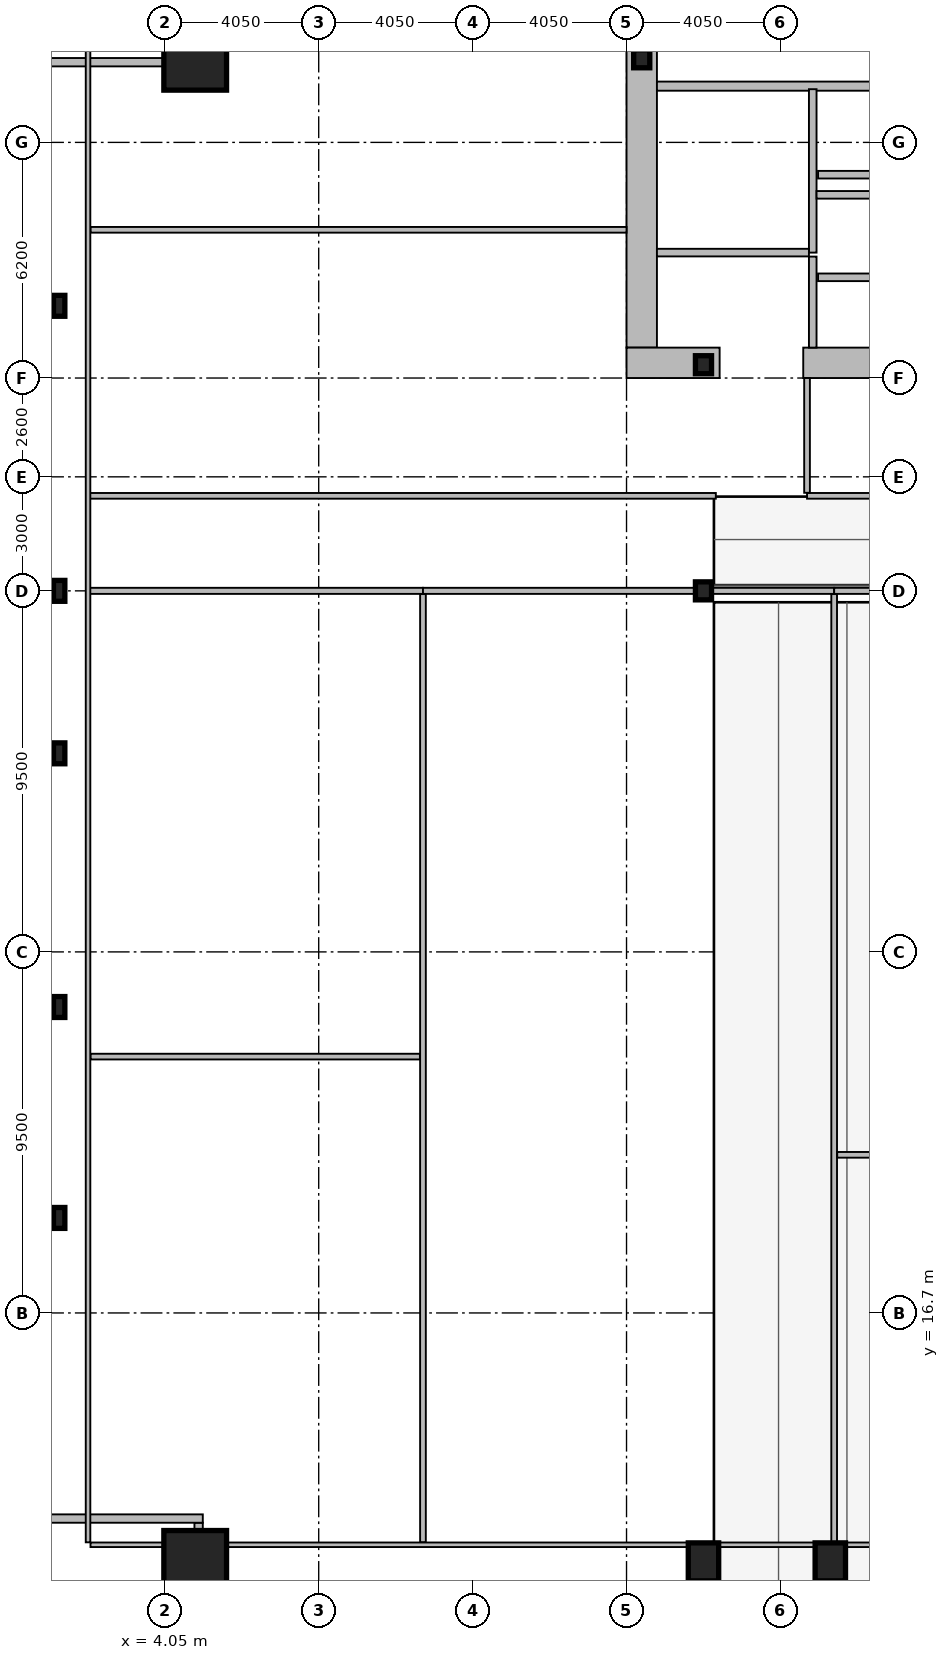
"""IFC4 building model, lengths in metres.
Left out: names, types, materials, properties, quantities, classifications, styles, units other than length and angle.
Written with IfcOpenShell. Run it as: python <this file> out.ifc"""

import sys

from ifc_helpers import new_model, si_unit, direction, frame, frame_2d, origin, origin_2d, place, context, subcontext, project, spatial, rectangle, hollow_rectangle, i_section, extrude, element, fill, save


model = new_model("IFC4")
c1 = context("Model", 3, precision=1e-05, world=origin(), true_north=direction((0.0, 1.0)))
c2 = subcontext(c1, "Body", "Model", "MODEL_VIEW")
j1 = project(units=[si_unit("LENGTHUNIT", "METRE"), si_unit("PLANEANGLEUNIT", "RADIAN")], contexts=[c1])
p1 = place(None, origin())
s1 = spatial("IfcSite", under=j1, at=p1, CompositionType="ELEMENT")
p2 = place(p1, origin())
s2 = spatial("IfcBuilding", under=s1, at=p2, CompositionType="ELEMENT")
p3 = place(p2, frame((0.0, 0.0, 61.8)))
s3 = spatial("IfcBuildingStorey", under=s2, at=p3, CompositionType="ELEMENT", Elevation=61.8)
p4 = place(p3, frame((16.6, 42.1, 0.0), z_axis=(0.0, 0.0, 1.0), x_axis=(0.0, 1.0, 0.0)))
e1 = element("IfcWall", 1, at=p4, inside=s3, PredefinedType="SHEAR", context=c2, shape_type="SweptSolid", body=[
    extrude(rectangle(XDim=10.8, YDim=0.8, at=frame_2d((5.4, 0.0))), origin(), (0.0, 0.0, 1.0), 3.82),
])
p5 = place(p3, frame((18.65, 41.7, 0.0), z_axis=(0.0, 0.0, 1.0), x_axis=(-1.0, 0.0, 0.0)))
e2 = element("IfcWall", 2, at=p5, inside=s3, PredefinedType="SHEAR", context=c2, shape_type="SweptSolid", body=[
    extrude(rectangle(XDim=2.45, YDim=0.8, at=frame_2d((1.225, 0.0))), origin(), (0.0, 0.0, 1.0), 3.82),
])
p6 = place(p3, frame((32.3, 41.7, 0.0), z_axis=(0.0, 0.0, 1.0), x_axis=(-1.0, 0.0, 0.0)))
e3 = element("IfcWall", 3, at=p6, inside=s3, PredefinedType="SHEAR", context=c2, shape_type="SweptSolid", body=[
    extrude(rectangle(XDim=11.45, YDim=0.8, at=frame_2d((5.725, 0.0))), origin(), (0.0, 0.0, 1.0), 3.82),
])
p7 = place(p3, frame((17.0, 48.98, 0.0), z_axis=(0.0, 0.0, 1.0), x_axis=(1.0, 0.0, 0.0)))
e4 = element("IfcWall", 4, at=p7, inside=s3, PredefinedType="SHEAR", context=c2, shape_type="SweptSolid", body=[
    extrude(rectangle(XDim=7.22, YDim=0.24, at=frame_2d((3.61, 0.0))), origin(), (0.0, 0.0, 1.0), 3.82),
])
p8 = place(p7, frame((0.22, 0.0, 0.0)))
e5 = element("IfcOpeningElement", 5, at=p8, cuts=e4, PredefinedType="OPENING", context=c2, shape_type="SweptSolid", body=[
    extrude(rectangle(XDim=1.05, YDim=2.15, at=frame_2d((0.525, 1.075))), frame((0.0, 0.13, 0.0), z_axis=(0.0, -1.0, 0.0), x_axis=(1.0, 0.0, 0.0)), (0.0, 0.0, 1.0), 0.26),
])
for number, where, z_axis, x_axis in (
    (6, (4.85, 10.15, 0.0), (0.0, 0.0, 1.0), (1.0, 0.0, 0.0)),
    (7, (4.85, 49.7, 0.0), (0.0, 0.0, 1.0), (1.0, 0.0, 0.0)),
):
    element("IfcColumn", number, at=place(p3, frame(where, z_axis=z_axis, x_axis=x_axis)), inside=s3, PredefinedType="COLUMN", context=c2, shape_type="SweptSolid", body=[
        extrude(hollow_rectangle(XDim=1.65, YDim=1.65, WallThickness=0.075, at=origin_2d()), origin(), (0.0, 0.0, 1.0), 4.0),
    ])
for number, where, z_axis, x_axis in (
    (8, (18.225, 10.15, 0.0), (0.0, 0.0, 1.0), (1.0, 0.0, 0.0)),
    (9, (21.562, 10.15, 0.0), (0.0, 0.0, 1.0), (1.0, 0.0, 0.0)),
):
    element("IfcColumn", number, at=place(p3, frame(where, z_axis=z_axis, x_axis=x_axis)), inside=s3, PredefinedType="COLUMN", context=c2, shape_type="SweptSolid", body=[
        extrude(hollow_rectangle(XDim=0.8, YDim=1.0, WallThickness=0.055, at=origin_2d()), origin(), (0.0, 0.0, 1.0), 4.0),
    ])
for number, where, z_axis, x_axis in (
    (10, (1.27, 19.2, 0.0), (0.0, 0.0, 1.0), (1.0, 0.0, 0.0)),
    (11, (1.27, 24.75, 0.0), (0.0, 0.0, 1.0), (1.0, 0.0, 0.0)),
    (12, (1.27, 31.425, 0.0), (0.0, 0.0, 1.0), (1.0, 0.0, 0.0)),
    (13, (1.27, 35.7, 0.0), (0.0, 0.0, 1.0), (1.0, 0.0, 0.0)),
    (14, (1.27, 43.2, 0.0), (0.0, 0.0, 1.0), (1.0, 0.0, 0.0)),
):
    element("IfcColumn", number, at=place(p3, frame(where, z_axis=z_axis, x_axis=x_axis)), inside=s3, PredefinedType="COLUMN", context=c2, shape_type="SweptSolid", body=[
        extrude(i_section(OverallWidth=0.3, OverallDepth=0.55, WebThickness=0.015, FlangeThickness=0.029, at=origin_2d()), origin(), (0.0, 0.0, 1.0), 4.0),
    ])
for number, where, z_axis, x_axis in (
    (15, (16.6, 49.7, 0.0), (0.0, 0.0, 1.0), (1.0, 0.0, 0.0)),
    (16, (18.225, 35.7, 0.0), (0.0, 0.0, 1.0), (1.0, 0.0, 0.0)),
    (17, (18.225, 41.65, 0.0), (0.0, 0.0, 1.0), (1.0, 0.0, 0.0)),
):
    element("IfcColumn", number, at=place(p3, frame(where, z_axis=z_axis, x_axis=x_axis)), inside=s3, PredefinedType="COLUMN", context=c2, shape_type="SweptSolid", body=[
        extrude(i_section(OverallWidth=0.424, OverallDepth=0.474, WebThickness=0.048, FlangeThickness=0.077, at=origin_2d()), origin(), (0.0, 0.0, 1.0), 4.0),
    ])
p9 = place(p3, frame((4.94, 7.27, 0.0), z_axis=(0.0, 0.0, 1.0), x_axis=(0.0, 1.0, 0.0)))
e18 = element("IfcWall", 18, at=p9, inside=s3, PredefinedType="SOLIDWALL", context=c2, shape_type="SweptSolid", body=[
    extrude(rectangle(XDim=3.91, YDim=0.22, at=frame_2d((1.955, 0.0))), origin(), (0.0, 0.0, 1.0), 3.16),
])
for number, where, z_axis, x_axis in (
    (19, (5.05, 11.29, 0.0), (0.0, 0.0, 1.0), (-1.0, 0.0, 0.0)),
    (20, (0.83, 49.61, 0.0), (0.0, 0.0, 1.0), (1.0, 0.0, 0.0)),
):
    element("IfcWall", number, at=place(p3, frame(where, z_axis=z_axis, x_axis=x_axis)), inside=s3, PredefinedType="SOLIDWALL", context=c2, shape_type="SweptSolid", body=[
        extrude(rectangle(XDim=4.22, YDim=0.22, at=frame_2d((2.11, 0.0))), origin(), (0.0, 0.0, 1.0), 3.16),
    ])
p10 = place(p3, frame((4.94, 49.72, 0.0), z_axis=(0.0, 0.0, 1.0), x_axis=(0.0, 1.0, 0.0)))
e21 = element("IfcWall", 21, at=p10, inside=s3, PredefinedType="SOLIDWALL", context=c2, shape_type="SweptSolid", body=[
    extrude(rectangle(XDim=3.91, YDim=0.22, at=frame_2d((1.955, 0.0))), origin(), (0.0, 0.0, 1.0), 3.16),
])
p11 = place(p3, frame((24.21, 43.95, 0.0), z_axis=(0.0, 0.0, 1.0), x_axis=(-1.0, 0.0, 0.0)))
e22 = element("IfcWall", 22, at=p11, inside=s3, PredefinedType="PARTITIONING", context=c2, shape_type="SweptSolid", body=[
    extrude(rectangle(XDim=2.97, YDim=0.2, at=frame_2d((1.485, 0.0))), origin(), (0.0, 0.0, 1.0), 3.82),
])
p12 = place(p11, frame((0.86, 0.0, 0.0)))
e23 = element("IfcOpeningElement", 23, at=p12, cuts=e22, PredefinedType="OPENING", context=c2, shape_type="SweptSolid", body=[
    extrude(rectangle(XDim=1.3, YDim=2.18, at=frame_2d((0.65, 1.09))), frame((0.0, 0.11, 0.0), z_axis=(0.0, -1.0, 0.0), x_axis=(1.0, 0.0, 0.0)), (0.0, 0.0, 1.0), 0.22),
])
p13 = place(p3, frame((24.21, 46.65, 0.0), z_axis=(0.0, 0.0, 1.0), x_axis=(-1.0, 0.0, 0.0)))
e24 = element("IfcWall", 24, at=p13, inside=s3, PredefinedType="PARTITIONING", context=c2, shape_type="SweptSolid", body=[
    extrude(rectangle(XDim=2.97, YDim=0.2, at=frame_2d((1.485, 0.0))), origin(), (0.0, 0.0, 1.0), 3.82),
])
p14 = place(p13, frame((0.91, 0.0, 0.0)))
e25 = element("IfcOpeningElement", 25, at=p14, cuts=e24, PredefinedType="OPENING", context=c2, shape_type="SweptSolid", body=[
    extrude(rectangle(XDim=1.2, YDim=2.18, at=frame_2d((0.6, 1.09))), frame((0.0, 0.11, 0.0), z_axis=(0.0, -1.0, 0.0), x_axis=(1.0, 0.0, 0.0)), (0.0, 0.0, 1.0), 0.22),
])
p15 = place(p3, frame((21.1, 44.6, 0.0), z_axis=(0.0, 0.0, 1.0), x_axis=(0.0, 1.0, 0.0)))
e26 = element("IfcWall", 26, at=p15, inside=s3, PredefinedType="PARTITIONING", context=c2, shape_type="SweptSolid", body=[
    extrude(rectangle(XDim=4.3, YDim=0.2, at=frame_2d((2.15, 0.0))), origin(), (0.0, 0.0, 1.0), 3.82),
])
p16 = place(p3, frame((17.0, 44.6, 0.0), z_axis=(0.0, 0.0, 1.0), x_axis=(1.0, 0.0, 0.0)))
e27 = element("IfcWall", 27, at=p16, inside=s3, PredefinedType="PARTITIONING", context=c2, shape_type="SweptSolid", body=[
    extrude(rectangle(XDim=4.0, YDim=0.2, at=frame_2d((2.0, 0.0))), origin(), (0.0, 0.0, 1.0), 3.82),
])
p17 = place(p16, frame((1.25, 0.0, 0.0)))
e28 = element("IfcOpeningElement", 28, at=p17, cuts=e27, PredefinedType="OPENING", context=c2, shape_type="SweptSolid", body=[
    extrude(rectangle(XDim=1.05, YDim=2.15, at=frame_2d((0.525, 1.075))), frame((0.0, 0.11, 0.0), z_axis=(0.0, -1.0, 0.0), x_axis=(1.0, 0.0, 0.0)), (0.0, 0.0, 1.0), 0.22),
])
p18 = place(p3, frame((21.2, 46.12, 0.0), z_axis=(0.0, 0.0, 1.0), x_axis=(1.0, 0.0, 0.0)))
e29 = element("IfcWall", 29, at=p18, inside=s3, PredefinedType="PARTITIONING", context=c2, shape_type="SweptSolid", body=[
    extrude(rectangle(XDim=3.02, YDim=0.2, at=frame_2d((1.51, 0.0))), origin(), (0.0, 0.0, 1.0), 3.82),
])
p19 = place(p3, frame((21.1, 42.1, 0.0), z_axis=(0.0, 0.0, 1.0), x_axis=(0.0, 1.0, 0.0)))
e30 = element("IfcWall", 30, at=p19, inside=s3, PredefinedType="PARTITIONING", context=c2, shape_type="SweptSolid", body=[
    extrude(rectangle(XDim=2.395, YDim=0.2, at=frame_2d((1.198, 0.0))), origin(), (0.0, 0.0, 1.0), 3.82),
])
p20 = place(p19, frame((0.38, 0.0, 0.0)))
e31 = element("IfcOpeningElement", 31, at=p20, cuts=e30, PredefinedType="OPENING", context=c2, shape_type="SweptSolid", body=[
    extrude(rectangle(XDim=1.05, YDim=2.15, at=frame_2d((0.525, 1.075))), frame((0.0, 0.11, 0.0), z_axis=(0.0, -1.0, 0.0), x_axis=(1.0, 0.0, 0.0)), (0.0, 0.0, 1.0), 0.22),
])
p21 = place(p3, frame((20.95, 38.2, 0.0), z_axis=(0.0, 0.0, 1.0), x_axis=(1.0, 0.0, 0.0)))
e32 = element("IfcWall", 32, at=p21, inside=s3, PredefinedType="PARTITIONING", context=c2, shape_type="SweptSolid", body=[
    extrude(rectangle(XDim=3.35, YDim=0.15, at=frame_2d((1.675, 0.0))), origin(), (0.0, 0.0, 1.0), 3.82),
])
p22 = place(p21, frame((0.9, 0.0, 0.0)))
e33 = element("IfcOpeningElement", 33, at=p22, cuts=e32, PredefinedType="OPENING", context=c2, shape_type="SweptSolid", body=[
    extrude(rectangle(XDim=0.95, YDim=2.05, at=frame_2d((0.475, 1.025))), frame((0.0, 0.085, 0.0), z_axis=(0.0, -1.0, 0.0), x_axis=(1.0, 0.0, 0.0)), (0.0, 0.0, 1.0), 0.17),
])
p23 = place(p3, frame((20.95, 38.28, 0.0), z_axis=(0.0, 0.0, 1.0), x_axis=(0.0, 1.0, 0.0)))
e34 = element("IfcWall", 34, at=p23, inside=s3, PredefinedType="PARTITIONING", context=c2, shape_type="SweptSolid", body=[
    extrude(rectangle(XDim=3.02, YDim=0.15, at=frame_2d((1.51, 0.0))), origin(), (0.0, 0.0, 1.0), 3.82),
])
p24 = place(p3, frame((2.03, 38.2, 0.0), z_axis=(0.0, 0.0, 1.0), x_axis=(1.0, 0.0, 0.0)))
e35 = element("IfcWall", 35, at=p24, inside=s3, PredefinedType="PARTITIONING", context=c2, shape_type="SweptSolid", body=[
    extrude(rectangle(XDim=16.52, YDim=0.15, at=frame_2d((8.26, 0.0))), origin(), (0.0, 0.0, 1.0), 3.01),
])
p25 = place(p24, frame((12.32, 0.0, 0.0)))
e36 = element("IfcOpeningElement", 36, at=p25, cuts=e35, PredefinedType="OPENING", context=c2, shape_type="SweptSolid", body=[
    extrude(rectangle(XDim=0.95, YDim=2.05, at=frame_2d((0.475, 1.025))), frame((0.0, 0.085, 0.0), z_axis=(0.0, -1.0, 0.0), x_axis=(1.0, 0.0, 0.0)), (0.0, 0.0, 1.0), 0.17),
])
p26 = place(p3, frame((2.095, 45.2, 0.0), z_axis=(0.0, 0.0, 1.0), x_axis=(1.0, 0.0, 0.0)))
e37 = element("IfcWall", 37, at=p26, inside=s3, PredefinedType="PARTITIONING", context=c2, shape_type="SweptSolid", body=[
    extrude(rectangle(XDim=14.105, YDim=0.15, at=frame_2d((7.052, 0.0))), origin(), (0.0, 0.0, 1.0), 3.16),
])
p27 = place(p26, frame((12.32, 0.0, 0.0)))
e38 = element("IfcOpeningElement", 38, at=p27, cuts=e37, PredefinedType="OPENING", context=c2, shape_type="SweptSolid", body=[
    extrude(rectangle(XDim=0.9, YDim=2.05, at=frame_2d((0.45, 1.025))), frame((0.0, 0.085, 0.0), z_axis=(0.0, -1.0, 0.0), x_axis=(1.0, 0.0, 0.0)), (0.0, 0.0, 1.0), 0.17),
])
p28 = place(p3, frame((2.03, 35.7, 0.0), z_axis=(0.0, 0.0, 1.0), x_axis=(1.0, 0.0, 0.0)))
e39 = element("IfcWall", 39, at=p28, inside=s3, PredefinedType="PARTITIONING", context=c2, shape_type="SweptSolid", body=[
    extrude(rectangle(XDim=8.813, YDim=0.16, at=frame_2d((4.407, 0.0))), origin(), (0.0, 0.0, 1.0), 3.01),
])
p29 = place(p28, frame((3.952, 0.0, 0.0)))
e40 = element("IfcOpeningElement", 40, at=p29, cuts=e39, PredefinedType="OPENING", context=c2, shape_type="SweptSolid", body=[
    extrude(rectangle(XDim=1.0, YDim=2.05, at=frame_2d((0.5, 1.025))), frame((0.0, 0.09, 0.0), z_axis=(0.0, -1.0, 0.0), x_axis=(1.0, 0.0, 0.0)), (0.0, 0.0, 1.0), 0.18),
])
p30 = place(p3, frame((2.095, 23.445, 0.0), z_axis=(0.0, 0.0, 1.0), x_axis=(1.0, 0.0, 0.0)))
e41 = element("IfcWall", 41, at=p30, inside=s3, PredefinedType="PARTITIONING", context=c2, shape_type="SweptSolid", body=[
    extrude(rectangle(XDim=8.668, YDim=0.15, at=frame_2d((4.334, 0.0))), origin(), (0.0, 0.0, 1.0), 3.82),
])
p31 = place(p30, frame((3.966, 0.0, 0.0)))
e42 = element("IfcOpeningElement", 42, at=p31, cuts=e41, PredefinedType="OPENING", context=c2, shape_type="SweptSolid", body=[
    extrude(rectangle(XDim=0.9, YDim=2.05, at=frame_2d((0.45, 1.025))), frame((0.0, 0.085, 0.0), z_axis=(0.0, -1.0, 0.0), x_axis=(1.0, 0.0, 0.0)), (0.0, 0.0, 1.0), 0.17),
])
p32 = place(p3, frame((10.844, 35.7, 0.0), z_axis=(0.0, 0.0, 1.0), x_axis=(1.0, 0.0, 0.0)))
e43 = element("IfcWall", 43, at=p32, inside=s3, PredefinedType="PARTITIONING", context=c2, shape_type="SweptSolid", body=[
    extrude(rectangle(XDim=10.82, YDim=0.16, at=frame_2d((5.41, 0.0))), origin(), (0.0, 0.0, 1.0), 3.01),
])
p33 = place(p32, frame((4.794, 0.0, 0.0)))
e44 = element("IfcOpeningElement", 44, at=p33, cuts=e43, PredefinedType="OPENING", context=c2, shape_type="SweptSolid", body=[
    extrude(rectangle(XDim=1.0, YDim=2.05, at=frame_2d((0.5, 1.025))), frame((0.0, 0.09, 0.0), z_axis=(0.0, -1.0, 0.0), x_axis=(1.0, 0.0, 0.0)), (0.0, 0.0, 1.0), 0.18),
])
p34 = place(p3, frame((10.844, 10.665, 0.0), z_axis=(0.0, 0.0, 1.0), x_axis=(0.0, 1.0, 0.0)))
e45 = element("IfcWall", 45, at=p34, inside=s3, PredefinedType="PARTITIONING", context=c2, shape_type="SweptSolid", body=[
    extrude(rectangle(XDim=24.95, YDim=0.15, at=frame_2d((12.475, 0.0))), origin(), (0.0, 0.0, 1.0), 3.01),
])
p35 = place(p3, frame((21.664, 35.7, 0.0), z_axis=(0.0, 0.0, 1.0), x_axis=(1.0, 0.0, 0.0)))
e46 = element("IfcWall", 46, at=p35, inside=s3, PredefinedType="PARTITIONING", context=c2, shape_type="SweptSolid", body=[
    extrude(rectangle(XDim=13.017, YDim=0.16, at=frame_2d((6.508, 0.0))), origin(), (0.0, 0.0, 1.0), 3.01),
])
p36 = place(p35, frame((5.717, 0.0, 0.0)))
e47 = element("IfcOpeningElement", 47, at=p36, cuts=e46, PredefinedType="OPENING", context=c2, shape_type="SweptSolid", body=[
    extrude(rectangle(XDim=1.0, YDim=2.05, at=frame_2d((0.5, 1.025))), frame((0.0, 0.09, 0.0), z_axis=(0.0, -1.0, 0.0), x_axis=(1.0, 0.0, 0.0)), (0.0, 0.0, 1.0), 0.18),
])
p37 = place(p3, frame((21.664, 10.665, 0.0), z_axis=(0.0, 0.0, 1.0), x_axis=(0.0, 1.0, 0.0)))
e48 = element("IfcWall", 48, at=p37, inside=s3, PredefinedType="PARTITIONING", context=c2, shape_type="SweptSolid", body=[
    extrude(rectangle(XDim=24.95, YDim=0.15, at=frame_2d((12.475, 0.0))), origin(), (0.0, 0.0, 1.0), 3.21),
])
p38 = place(p3, frame((21.744, 20.861, 0.0), z_axis=(0.0, 0.0, 1.0), x_axis=(1.0, 0.0, 0.0)))
e49 = element("IfcWall", 49, at=p38, inside=s3, PredefinedType="PARTITIONING", context=c2, shape_type="SweptSolid", body=[
    extrude(rectangle(XDim=12.857, YDim=0.15, at=frame_2d((6.428, 0.0))), origin(), (0.0, 0.0, 1.0), 3.01),
])
p39 = place(p38, frame((5.858, 0.0, 0.0)))
e50 = element("IfcOpeningElement", 50, at=p39, cuts=e49, PredefinedType="OPENING", context=c2, shape_type="SweptSolid", body=[
    extrude(rectangle(XDim=0.9, YDim=2.05, at=frame_2d((0.45, 1.025))), frame((0.0, 0.085, 0.0), z_axis=(0.0, -1.0, 0.0), x_axis=(1.0, 0.0, 0.0)), (0.0, 0.0, 1.0), 0.17),
])
p40 = place(p3, frame((2.03, 10.665, 0.0), z_axis=(0.0, 0.0, 1.0), x_axis=(0.0, 1.0, 0.0)))
e51 = element("IfcWall", 51, at=p40, inside=s3, PredefinedType="PARTITIONING", context=c2, shape_type="SweptSolid", body=[
    extrude(rectangle(XDim=42.11, YDim=0.12, at=frame_2d((21.055, 0.0))), origin(), (0.0, 0.0, 1.0), 3.01),
])
p41 = place(p3, frame((2.095, 10.6, 0.0), z_axis=(0.0, 0.0, 1.0), x_axis=(1.0, 0.0, 0.0)))
e52 = element("IfcWall", 52, at=p41, inside=s3, PredefinedType="PARTITIONING", context=c2, shape_type="SweptSolid", body=[
    extrude(rectangle(XDim=68.71, YDim=0.12, at=frame_2d((34.355, 0.0))), origin(), (0.0, 0.0, 1.0), 3.01),
])
p42 = place(p8, origin())
e53 = element("IfcDoor", 53, at=p42, inside=s3, OperationType="SINGLE_SWING_LEFT", PredefinedType="DOOR", context=c2, shape_type="SweptSolid", body=[
    extrude(rectangle(XDim=1.05, YDim=2.15, at=frame_2d((0.525, 1.075))), frame((0.0, 0.025, 0.0), z_axis=(0.0, -1.0, 0.0), x_axis=(1.0, 0.0, 0.0)), (0.0, 0.0, 1.0), 0.05),
])
fill(e5, e53)
p43 = place(p12, origin())
e54 = element("IfcDoor", 54, at=p43, inside=s3, OperationType="SLIDING_TO_LEFT", PredefinedType="DOOR", context=c2, shape_type="SweptSolid", body=[
    extrude(rectangle(XDim=1.3, YDim=2.18, at=frame_2d((0.65, 1.09))), frame((0.0, 0.025, 0.0), z_axis=(0.0, -1.0, 0.0), x_axis=(1.0, 0.0, 0.0)), (0.0, 0.0, 1.0), 0.05),
])
fill(e23, e54)
p44 = place(p14, origin())
e55 = element("IfcDoor", 55, at=p44, inside=s3, OperationType="SLIDING_TO_LEFT", PredefinedType="DOOR", context=c2, shape_type="SweptSolid", body=[
    extrude(rectangle(XDim=1.2, YDim=2.18, at=frame_2d((0.6, 1.09))), frame((0.0, 0.025, 0.0), z_axis=(0.0, -1.0, 0.0), x_axis=(1.0, 0.0, 0.0)), (0.0, 0.0, 1.0), 0.05),
])
fill(e25, e55)
p45 = place(p17, origin())
e56 = element("IfcDoor", 56, at=p45, inside=s3, OperationType="SINGLE_SWING_RIGHT", PredefinedType="DOOR", context=c2, shape_type="SweptSolid", body=[
    extrude(rectangle(XDim=1.05, YDim=2.15, at=frame_2d((0.525, 1.075))), frame((0.0, 0.025, 0.0), z_axis=(0.0, -1.0, 0.0), x_axis=(1.0, 0.0, 0.0)), (0.0, 0.0, 1.0), 0.05),
])
fill(e28, e56)
p46 = place(p20, origin())
e57 = element("IfcDoor", 57, at=p46, inside=s3, OperationType="SINGLE_SWING_LEFT", PredefinedType="DOOR", context=c2, shape_type="SweptSolid", body=[
    extrude(rectangle(XDim=1.05, YDim=2.15, at=frame_2d((0.525, 1.075))), frame((0.0, 0.025, 0.0), z_axis=(0.0, -1.0, 0.0), x_axis=(1.0, 0.0, 0.0)), (0.0, 0.0, 1.0), 0.05),
])
fill(e31, e57)
p47 = place(p22, origin())
e58 = element("IfcDoor", 58, at=p47, inside=s3, OperationType="SINGLE_SWING_RIGHT", PredefinedType="DOOR", context=c2, shape_type="SweptSolid", body=[
    extrude(rectangle(XDim=0.95, YDim=2.05, at=frame_2d((0.475, 1.025))), frame((0.0, 0.025, 0.0), z_axis=(0.0, -1.0, 0.0), x_axis=(1.0, 0.0, 0.0)), (0.0, 0.0, 1.0), 0.05),
])
fill(e33, e58)
p48 = place(p25, origin())
e59 = element("IfcDoor", 59, at=p48, inside=s3, OperationType="SINGLE_SWING_LEFT", PredefinedType="DOOR", context=c2, shape_type="SweptSolid", body=[
    extrude(rectangle(XDim=0.95, YDim=2.05, at=frame_2d((0.475, 1.025))), frame((0.0, 0.025, 0.0), z_axis=(0.0, -1.0, 0.0), x_axis=(1.0, 0.0, 0.0)), (0.0, 0.0, 1.0), 0.05),
])
fill(e36, e59)
p49 = place(p27, origin())
e60 = element("IfcDoor", 60, at=p49, inside=s3, OperationType="SINGLE_SWING_LEFT", PredefinedType="DOOR", context=c2, shape_type="SweptSolid", body=[
    extrude(rectangle(XDim=0.9, YDim=2.05, at=frame_2d((0.45, 1.025))), frame((0.0, 0.025, 0.0), z_axis=(0.0, -1.0, 0.0), x_axis=(1.0, 0.0, 0.0)), (0.0, 0.0, 1.0), 0.05),
])
fill(e38, e60)
p50 = place(p29, origin())
e61 = element("IfcDoor", 61, at=p50, inside=s3, OperationType="SINGLE_SWING_LEFT", PredefinedType="DOOR", context=c2, shape_type="SweptSolid", body=[
    extrude(rectangle(XDim=1.0, YDim=2.05, at=frame_2d((0.5, 1.025))), frame((0.0, 0.025, 0.0), z_axis=(0.0, -1.0, 0.0), x_axis=(1.0, 0.0, 0.0)), (0.0, 0.0, 1.0), 0.05),
])
fill(e40, e61)
p51 = place(p31, origin())
e62 = element("IfcDoor", 62, at=p51, inside=s3, OperationType="SINGLE_SWING_RIGHT", PredefinedType="DOOR", context=c2, shape_type="SweptSolid", body=[
    extrude(rectangle(XDim=0.9, YDim=2.05, at=frame_2d((0.45, 1.025))), frame((0.0, 0.025, 0.0), z_axis=(0.0, -1.0, 0.0), x_axis=(1.0, 0.0, 0.0)), (0.0, 0.0, 1.0), 0.05),
])
fill(e42, e62)
p52 = place(p33, origin())
e63 = element("IfcDoor", 63, at=p52, inside=s3, OperationType="SINGLE_SWING_LEFT", PredefinedType="DOOR", context=c2, shape_type="SweptSolid", body=[
    extrude(rectangle(XDim=1.0, YDim=2.05, at=frame_2d((0.5, 1.025))), frame((0.0, 0.025, 0.0), z_axis=(0.0, -1.0, 0.0), x_axis=(1.0, 0.0, 0.0)), (0.0, 0.0, 1.0), 0.05),
])
fill(e44, e63)
save(model, sys.argv[1])
